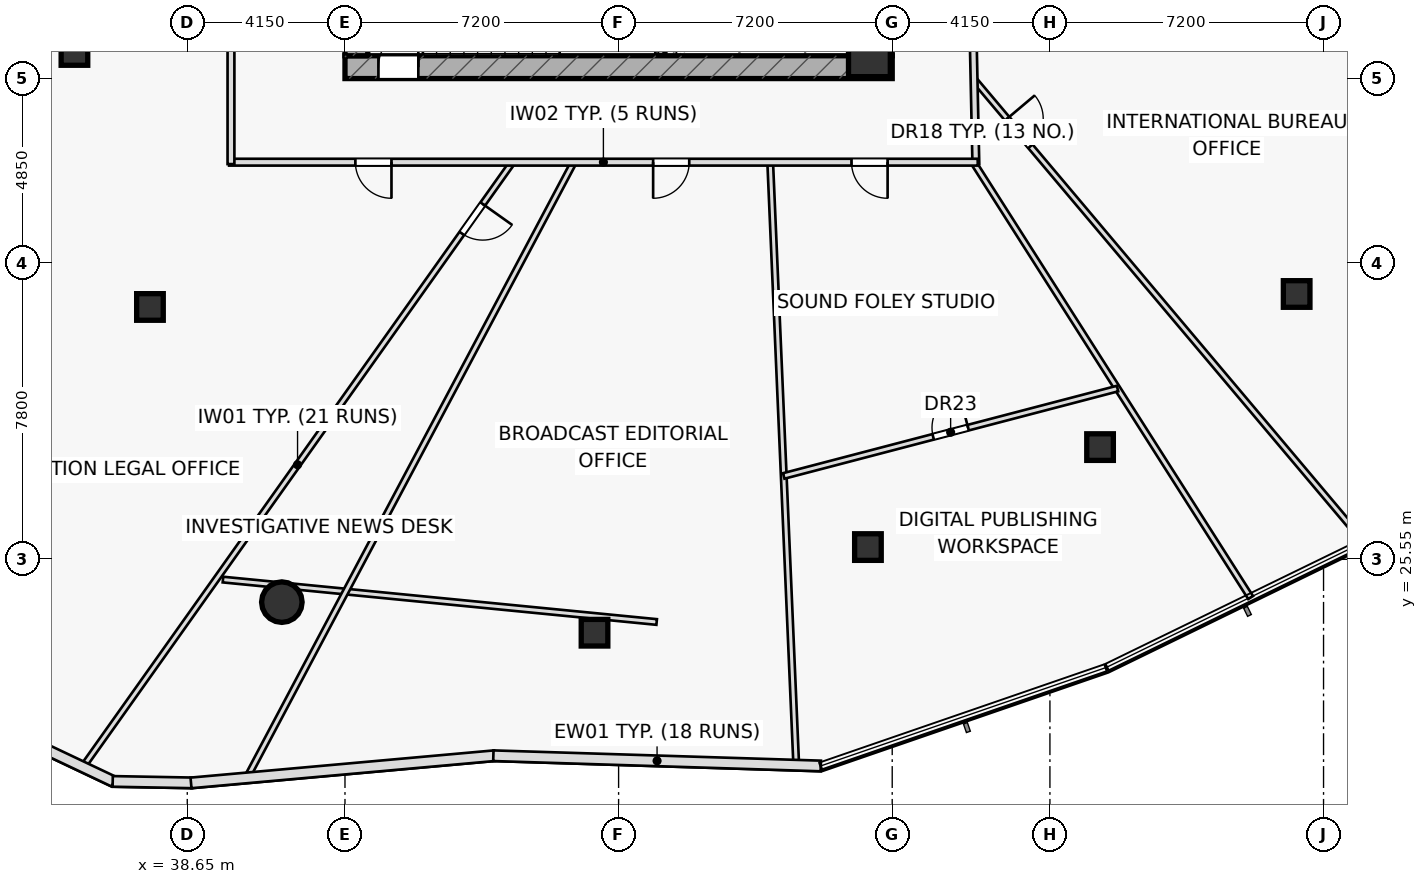
"""IFC4 building model, lengths in metres.
Left out: names, types, materials, properties, quantities, classifications, styles, units other than length and angle.
Written with IfcOpenShell. Run it as: python <this file> out.ifc"""

import sys

from ifc_helpers import new_model, si_unit, direction, frame, frame_2d, origin, origin_2d, place, context, subcontext, project, spatial, rectangle, hollow_rectangle, hollow_circle, extrude, element, fill, save


model = new_model("IFC4")
c1 = context("Model", 3, precision=1e-05, world=origin(), true_north=direction((0.0, 1.0)))
c2 = subcontext(c1, "Body", "Model", "MODEL_VIEW")
j1 = project(units=[si_unit("LENGTHUNIT", "METRE"), si_unit("PLANEANGLEUNIT", "RADIAN")], contexts=[c1])
p1 = place(None, origin())
s1 = spatial("IfcSite", under=j1, at=p1, CompositionType="ELEMENT")
p2 = place(p1, origin())
s2 = spatial("IfcBuilding", under=s1, at=p2, CompositionType="ELEMENT")
p3 = place(p2, frame((0.0, 0.0, 127.15)))
s3 = spatial("IfcBuildingStorey", under=s2, at=p3, CompositionType="ELEMENT", Elevation=127.15)
p4 = place(p3, frame((51.11, 38.8, 0.0), z_axis=(0.0, 0.0, 1.0), x_axis=(0.0, 1.0, 0.0)))
e1 = element("IfcWall", 1, at=p4, inside=s3, PredefinedType="SHEAR", context=c2, shape_type="SweptSolid", body=[
    extrude(rectangle(XDim=3.1, YDim=0.22, at=frame_2d((1.55, 0.0))), origin(), (0.0, 0.0, 1.0), 3.55),
])
p5 = place(p3, frame((42.8, 38.5, 0.0), z_axis=(0.0, 0.0, 1.0), x_axis=(1.0, 0.0, 0.0)))
e2 = element("IfcWall", 2, at=p5, inside=s3, PredefinedType="SHEAR", context=c2, shape_type="SweptSolid", body=[
    extrude(rectangle(XDim=14.4, YDim=0.6, at=frame_2d((7.2, 0.0))), origin(), (0.0, 0.0, 1.0), 3.55),
])
p6 = place(p5, frame((0.88, 0.0, 0.0)))
e3 = element("IfcOpeningElement", 3, at=p6, cuts=e2, PredefinedType="OPENING", context=c2, shape_type="SweptSolid", body=[
    extrude(rectangle(XDim=1.05, YDim=2.2, at=frame_2d((0.525, 1.1))), frame((0.0, 0.31, 0.0), z_axis=(0.0, -1.0, 0.0), x_axis=(1.0, 0.0, 0.0)), (0.0, 0.0, 1.0), 0.62),
])
p7 = place(p3, frame((43.1, 38.8, 0.0), z_axis=(0.0, 0.0, 1.0), x_axis=(0.0, 1.0, 0.0)))
e4 = element("IfcWall", 4, at=p7, inside=s3, PredefinedType="SHEAR", context=c2, shape_type="SweptSolid", body=[
    extrude(rectangle(XDim=12.4, YDim=0.6, at=frame_2d((6.2, 0.0))), origin(), (0.0, 0.0, 1.0), 3.55),
])
p8 = place(p3, frame((56.9, 38.8, 0.0), z_axis=(0.0, 0.0, 1.0), x_axis=(0.0, 1.0, 0.0)))
e5 = element("IfcWall", 5, at=p8, inside=s3, PredefinedType="SHEAR", context=c2, shape_type="SweptSolid", body=[
    extrude(rectangle(XDim=12.4, YDim=0.6, at=frame_2d((6.2, 0.0))), origin(), (0.0, 0.0, 1.0), 3.55),
])
p9 = place(p8, frame((3.85, 0.0, 0.0)))
e6 = element("IfcOpeningElement", 6, at=p9, cuts=e5, PredefinedType="OPENING", context=c2, shape_type="SweptSolid", body=[
    extrude(rectangle(XDim=1.5, YDim=2.2, at=frame_2d((0.75, 1.1))), frame((0.0, 0.31, 0.0), z_axis=(0.0, -1.0, 0.0), x_axis=(1.0, 0.0, 0.0)), (0.0, 0.0, 1.0), 0.62),
])
p10 = place(p3, frame((56.6, 38.8, 0.0), z_axis=(0.0, 0.0, 1.0), x_axis=(1.0, 0.0, 0.0)))
e7 = element("IfcColumn", 7, at=p10, inside=s3, PredefinedType="COLUMN", context=c2, shape_type="SweptSolid", body=[
    extrude(rectangle(XDim=1.1, YDim=1.1, at=origin_2d()), origin(), (0.0, 0.0, 1.0), 3.55),
])
for number, where, z_axis, x_axis in (
    (8, (35.681, 38.9, 0.0), (0.0, 0.0, 1.0), (1.0, 0.0, 0.0)),
    (9, (37.668, 32.19, 0.0), (0.0, 0.0, 1.0), (1.0, 0.0, 0.0)),
):
    element("IfcColumn", number, at=place(p3, frame(where, z_axis=z_axis, x_axis=x_axis)), inside=s3, PredefinedType="COLUMN", context=c2, shape_type="SweptSolid", body=[
        extrude(hollow_rectangle(XDim=0.7, YDim=0.7, WallThickness=0.04, at=origin_2d()), origin(), (0.0, 0.0, 1.0), 3.55),
    ])
p11 = place(p3, frame((41.139, 24.424, 0.0), z_axis=(0.0, 0.0, 1.0), x_axis=(1.0, 0.0, 0.0)))
e10 = element("IfcColumn", 10, at=p11, inside=s3, PredefinedType="COLUMN", context=c2, shape_type="SweptSolid", body=[
    extrude(hollow_circle(Radius=0.533, WallThickness=0.045, at=origin_2d()), origin(), (0.0, 0.0, 1.0), 3.55),
])
for number, where, z_axis, x_axis in (
    (11, (49.366, 23.619, 0.0), (0.0, 0.0, 1.0), (1.0, 0.0, 0.0)),
    (12, (56.561, 25.873, 0.0), (0.0, 0.0, 1.0), (1.0, 0.0, 0.0)),
    (13, (62.669, 28.503, 0.0), (0.0, 0.0, 1.0), (1.0, 0.0, 0.0)),
    (14, (67.842, 32.532, 0.0), (0.0, 0.0, 1.0), (1.0, 0.0, 0.0)),
):
    element("IfcColumn", number, at=place(p3, frame(where, z_axis=z_axis, x_axis=x_axis)), inside=s3, PredefinedType="COLUMN", context=c2, shape_type="SweptSolid", body=[
        extrude(hollow_rectangle(XDim=0.7, YDim=0.7, WallThickness=0.04, at=origin_2d()), origin(), (0.0, 0.0, 1.0), 3.55),
    ])
p12 = place(p3, frame((39.589, 25.018, 0.0), z_axis=(0.0, 0.0, 1.0), x_axis=(0.99524905582, -0.097361783517, 0.0)))
e15 = element("IfcWall", 15, at=p12, inside=s3, PredefinedType="PARTITIONING", context=c2, shape_type="SweptSolid", body=[
    extrude(rectangle(XDim=11.467, YDim=0.15, at=frame_2d((5.733, 0.0))), origin(), (0.0, 0.0, 1.0), 2.835),
])
p13 = place(p3, frame((59.333, 36.0, 0.0), z_axis=(0.0, 0.0, 1.0), x_axis=(0.537304584645, -0.84338827554, 0.0)))
e16 = element("IfcWall", 16, at=p13, inside=s3, PredefinedType="PARTITIONING", context=c2, shape_type="SweptSolid", body=[
    extrude(rectangle(XDim=13.583, YDim=0.15, at=frame_2d((6.792, 0.0))), origin(), (0.0, 0.0, 1.0), 2.975),
])
p14 = place(p3, frame((59.354, 38.177, 0.0), z_axis=(0.0, 0.0, 1.0), x_axis=(0.644617104297, -0.764505584576, 0.0)))
e17 = element("IfcWall", 17, at=p14, inside=s3, PredefinedType="PARTITIONING", context=c2, shape_type="SweptSolid", body=[
    extrude(rectangle(XDim=15.927, YDim=0.15, at=frame_2d((7.963, 0.0))), origin(), (0.0, 0.0, 1.0), 2.835),
])
p15 = place(p14, frame((1.35, 0.0, 0.0)))
e18 = element("IfcOpeningElement", 18, at=p15, cuts=e17, PredefinedType="OPENING", context=c2, shape_type="SweptSolid", body=[
    extrude(rectangle(XDim=0.95, YDim=2.05, at=frame_2d((0.475, 1.025))), frame((0.0, 0.085, 0.0), z_axis=(0.0, -1.0, 0.0), x_axis=(1.0, 0.0, 0.0)), (0.0, 0.0, 1.0), 0.17),
])
p16 = place(p3, frame((62.65, 42.096, 0.0), z_axis=(0.0, 0.0, 1.0), x_axis=(0.952197713862, -0.305482427834, 0.0)))
e19 = element("IfcWall", 19, at=p16, inside=s3, PredefinedType="PARTITIONING", context=c2, shape_type="SweptSolid", body=[
    extrude(rectangle(XDim=18.8, YDim=0.15, at=frame_2d((9.4, 0.0))), origin(), (0.0, 0.0, 1.0), 2.835),
])
p17 = place(p16, frame((1.35, 0.0, 0.0)))
e20 = element("IfcOpeningElement", 20, at=p17, cuts=e19, PredefinedType="OPENING", context=c2, shape_type="SweptSolid", body=[
    extrude(rectangle(XDim=0.95, YDim=2.05, at=frame_2d((0.475, 1.025))), frame((0.0, 0.085, 0.0), z_axis=(0.0, -1.0, 0.0), x_axis=(1.0, 0.0, 0.0)), (0.0, 0.0, 1.0), 0.17),
])
p18 = place(p3, frame((47.207, 36.0, 0.0), z_axis=(0.0, 0.0, 1.0), x_axis=(-0.579100670618, -0.815256041554, 0.0)))
e21 = element("IfcWall", 21, at=p18, inside=s3, PredefinedType="PARTITIONING", context=c2, shape_type="SweptSolid", body=[
    extrude(rectangle(XDim=19.531, YDim=0.15, at=frame_2d((9.765, 0.0))), origin(), (0.0, 0.0, 1.0), 2.835),
])
p19 = place(p18, frame((1.35, 0.0, 0.0)))
e22 = element("IfcOpeningElement", 22, at=p19, cuts=e21, PredefinedType="OPENING", context=c2, shape_type="SweptSolid", body=[
    extrude(rectangle(XDim=0.95, YDim=2.05, at=frame_2d((0.475, 1.025))), frame((0.0, 0.085, 0.0), z_axis=(0.0, -1.0, 0.0), x_axis=(1.0, 0.0, 0.0)), (0.0, 0.0, 1.0), 0.17),
])
p20 = place(p3, frame((48.821, 36.0, 0.0), z_axis=(0.0, 0.0, 1.0), x_axis=(-0.469014212792, -0.883190618269, 0.0)))
e23 = element("IfcWall", 23, at=p20, inside=s3, PredefinedType="PARTITIONING", context=c2, shape_type="SweptSolid", body=[
    extrude(rectangle(XDim=18.356, YDim=0.15, at=frame_2d((9.178, 0.0))), origin(), (0.0, 0.0, 1.0), 2.835),
])
p21 = place(p3, frame((53.989, 36.0, 0.0), z_axis=(0.0, 0.0, 1.0), x_axis=(0.043169878473, -0.999067746248, 0.0)))
e24 = element("IfcWall", 24, at=p21, inside=s3, PredefinedType="PARTITIONING", context=c2, shape_type="SweptSolid", body=[
    extrude(rectangle(XDim=15.892, YDim=0.15, at=frame_2d((7.946, 0.0))), origin(), (0.0, 0.0, 1.0), 2.975),
])
p22 = place(p3, frame((54.346, 27.744, 0.0), z_axis=(0.0, 0.0, 1.0), x_axis=(0.967405326055, 0.2532329661, 0.0)))
e25 = element("IfcWall", 25, at=p22, inside=s3, PredefinedType="PARTITIONING", context=c2, shape_type="SweptSolid", body=[
    extrude(rectangle(XDim=9.079, YDim=0.15, at=frame_2d((4.54, 0.0))), origin(), (0.0, 0.0, 1.0), 2.835),
])
p23 = place(p22, frame((4.064, 0.0, 0.0)))
e26 = element("IfcOpeningElement", 26, at=p23, cuts=e25, PredefinedType="OPENING", context=c2, shape_type="SweptSolid", body=[
    extrude(rectangle(XDim=0.95, YDim=2.05, at=frame_2d((0.475, 1.025))), frame((0.0, 0.085, 0.0), z_axis=(0.0, -1.0, 0.0), x_axis=(1.0, 0.0, 0.0)), (0.0, 0.0, 1.0), 0.17),
])
p24 = place(p3, frame((59.291, 41.1, 0.0), z_axis=(0.0, 0.0, 1.0), x_axis=(0.021374589398, -0.999771537366, 0.0)))
e27 = element("IfcWall", 27, at=p24, inside=s3, PredefinedType="PARTITIONING", context=c2, shape_type="SweptSolid", body=[
    extrude(rectangle(XDim=5.151, YDim=0.18, at=frame_2d((2.576, 0.0))), origin(), (0.0, 0.0, 1.0), 2.835),
])
p25 = place(p24, frame((1.175, 0.0, 0.0)))
e28 = element("IfcOpeningElement", 28, at=p25, cuts=e27, PredefinedType="OPENING", context=c2, shape_type="SweptSolid", body=[
    extrude(rectangle(XDim=0.95, YDim=2.05, at=frame_2d((0.475, 1.025))), frame((0.0, 0.1, 0.0), z_axis=(0.0, -1.0, 0.0), x_axis=(1.0, 0.0, 0.0)), (0.0, 0.0, 1.0), 0.2),
])
p26 = place(p3, frame((59.45, 36.0, 0.0), z_axis=(0.0, 0.0, 1.0), x_axis=(-1.0, 0.0, 0.0)))
e29 = element("IfcWall", 29, at=p26, inside=s3, PredefinedType="PARTITIONING", context=c2, shape_type="SweptSolid", body=[
    extrude(rectangle(XDim=19.7, YDim=0.18, at=frame_2d((9.85, 0.0))), origin(), (0.0, 0.0, 1.0), 2.835),
])
p27 = place(p26, frame((2.371, 0.0, 0.0)))
e30 = element("IfcOpeningElement", 30, at=p27, cuts=e29, PredefinedType="OPENING", context=c2, shape_type="SweptSolid", body=[
    extrude(rectangle(XDim=0.95, YDim=2.05, at=frame_2d((0.475, 1.025))), frame((0.0, 0.1, 0.0), z_axis=(0.0, -1.0, 0.0), x_axis=(1.0, 0.0, 0.0)), (0.0, 0.0, 1.0), 0.2),
])
p28 = place(p26, frame((7.591, 0.0, 0.0)))
e31 = element("IfcOpeningElement", 31, at=p28, cuts=e29, PredefinedType="OPENING", context=c2, shape_type="SweptSolid", body=[
    extrude(rectangle(XDim=0.95, YDim=2.05, at=frame_2d((0.475, 1.025))), frame((0.0, 0.1, 0.0), z_axis=(0.0, -1.0, 0.0), x_axis=(1.0, 0.0, 0.0)), (0.0, 0.0, 1.0), 0.2),
])
p29 = place(p26, frame((15.427, 0.0, 0.0)))
e32 = element("IfcOpeningElement", 32, at=p29, cuts=e29, PredefinedType="OPENING", context=c2, shape_type="SweptSolid", body=[
    extrude(rectangle(XDim=0.95, YDim=2.05, at=frame_2d((0.475, 1.025))), frame((0.0, 0.1, 0.0), z_axis=(0.0, -1.0, 0.0), x_axis=(1.0, 0.0, 0.0)), (0.0, 0.0, 1.0), 0.2),
])
p30 = place(p3, frame((39.8, 35.95, 0.0), z_axis=(0.0, 0.0, 1.0), x_axis=(0.0, 1.0, 0.0)))
e33 = element("IfcWall", 33, at=p30, inside=s3, PredefinedType="PARTITIONING", context=c2, shape_type="SweptSolid", body=[
    extrude(rectangle(XDim=4.3, YDim=0.18, at=frame_2d((2.15, 0.0))), origin(), (0.0, 0.0, 1.0), 2.835),
])
p31 = place(p3, frame((34.847, 20.585, 0.0), z_axis=(0.0, 0.0, 1.0), x_axis=(0.903716205928, -0.428132011351, 0.0)))
e34 = element("IfcWall", 34, at=p31, inside=s3, PredefinedType="STANDARD", context=c2, shape_type="SweptSolid", body=[
    extrude(rectangle(XDim=2.068, YDim=0.28, at=frame_2d((1.034, 0.0))), origin(), (0.0, 0.0, 1.0), 3.55),
])
p32 = place(p3, frame((36.688, 19.707, 0.0), z_axis=(0.0, 0.0, 1.0), x_axis=(0.999829775202, -0.018450491063, 0.0)))
e35 = element("IfcWall", 35, at=p32, inside=s3, PredefinedType="STANDARD", context=c2, shape_type="SweptSolid", body=[
    extrude(rectangle(XDim=2.091, YDim=0.28, at=frame_2d((1.045, 0.0))), origin(), (0.0, 0.0, 1.0), 3.55),
])
p33 = place(p3, frame((38.748, 19.667, 0.0), z_axis=(0.0, 0.0, 1.0), x_axis=(0.996004258256, 0.089305753094, 0.0)))
e36 = element("IfcWall", 36, at=p33, inside=s3, PredefinedType="STANDARD", context=c2, shape_type="SweptSolid", body=[
    extrude(rectangle(XDim=8.018, YDim=0.28, at=frame_2d((4.009, 0.0))), origin(), (0.0, 0.0, 1.0), 3.55),
])
p34 = place(p3, frame((46.704, 20.383, 0.0), z_axis=(0.0, 0.0, 1.0), x_axis=(0.999511053197, -0.031267467704, 0.0)))
e37 = element("IfcWall", 37, at=p34, inside=s3, PredefinedType="STANDARD", context=c2, shape_type="SweptSolid", body=[
    extrude(rectangle(XDim=8.62, YDim=0.28, at=frame_2d((4.31, 0.0))), origin(), (0.0, 0.0, 1.0), 3.55),
])
p35 = place(p6, origin())
e38 = element("IfcDoor", 38, at=p35, inside=s3, OperationType="SINGLE_SWING_RIGHT", PredefinedType="DOOR", context=c2, shape_type="SweptSolid", body=[
    extrude(rectangle(XDim=1.05, YDim=2.2, at=frame_2d((0.525, 1.1))), frame((0.0, 0.025, 0.0), z_axis=(0.0, -1.0, 0.0), x_axis=(1.0, 0.0, 0.0)), (0.0, 0.0, 1.0), 0.05),
])
fill(e3, e38)
p36 = place(p15, origin())
e39 = element("IfcDoor", 39, at=p36, inside=s3, OperationType="SINGLE_SWING_LEFT", PredefinedType="DOOR", context=c2, shape_type="SweptSolid", body=[
    extrude(rectangle(XDim=0.95, YDim=2.05, at=frame_2d((0.475, 1.025))), frame((0.0, 0.025, 0.0), z_axis=(0.0, -1.0, 0.0), x_axis=(1.0, 0.0, 0.0)), (0.0, 0.0, 1.0), 0.05),
])
fill(e18, e39)
p37 = place(p19, origin())
e40 = element("IfcDoor", 40, at=p37, inside=s3, OperationType="SINGLE_SWING_LEFT", PredefinedType="DOOR", context=c2, shape_type="SweptSolid", body=[
    extrude(rectangle(XDim=0.95, YDim=2.05, at=frame_2d((0.475, 1.025))), frame((0.0, 0.025, 0.0), z_axis=(0.0, -1.0, 0.0), x_axis=(1.0, 0.0, 0.0)), (0.0, 0.0, 1.0), 0.05),
])
fill(e22, e40)
p38 = place(p23, origin())
e41 = element("IfcDoor", 41, at=p38, inside=s3, OperationType="SINGLE_SWING_RIGHT", PredefinedType="DOOR", context=c2, shape_type="SweptSolid", body=[
    extrude(rectangle(XDim=0.95, YDim=2.05, at=frame_2d((0.475, 1.025))), frame((0.0, 0.025, 0.0), z_axis=(0.0, -1.0, 0.0), x_axis=(1.0, 0.0, 0.0)), (0.0, 0.0, 1.0), 0.05),
])
fill(e26, e41)
p39 = place(p27, origin())
e42 = element("IfcDoor", 42, at=p39, inside=s3, OperationType="SINGLE_SWING_LEFT", PredefinedType="DOOR", context=c2, shape_type="SweptSolid", body=[
    extrude(rectangle(XDim=0.95, YDim=2.05, at=frame_2d((0.475, 1.025))), frame((0.0, 0.025, 0.0), z_axis=(0.0, -1.0, 0.0), x_axis=(1.0, 0.0, 0.0)), (0.0, 0.0, 1.0), 0.05),
])
fill(e30, e42)
p40 = place(p28, origin())
e43 = element("IfcDoor", 43, at=p40, inside=s3, OperationType="SINGLE_SWING_RIGHT", PredefinedType="DOOR", context=c2, shape_type="SweptSolid", body=[
    extrude(rectangle(XDim=0.95, YDim=2.05, at=frame_2d((0.475, 1.025))), frame((0.0, 0.025, 0.0), z_axis=(0.0, -1.0, 0.0), x_axis=(1.0, 0.0, 0.0)), (0.0, 0.0, 1.0), 0.05),
])
fill(e31, e43)
p41 = place(p29, origin())
e44 = element("IfcDoor", 44, at=p41, inside=s3, OperationType="SINGLE_SWING_LEFT", PredefinedType="DOOR", context=c2, shape_type="SweptSolid", body=[
    extrude(rectangle(XDim=0.95, YDim=2.05, at=frame_2d((0.475, 1.025))), frame((0.0, 0.025, 0.0), z_axis=(0.0, -1.0, 0.0), x_axis=(1.0, 0.0, 0.0)), (0.0, 0.0, 1.0), 0.05),
])
fill(e32, e44)
save(model, sys.argv[1])
